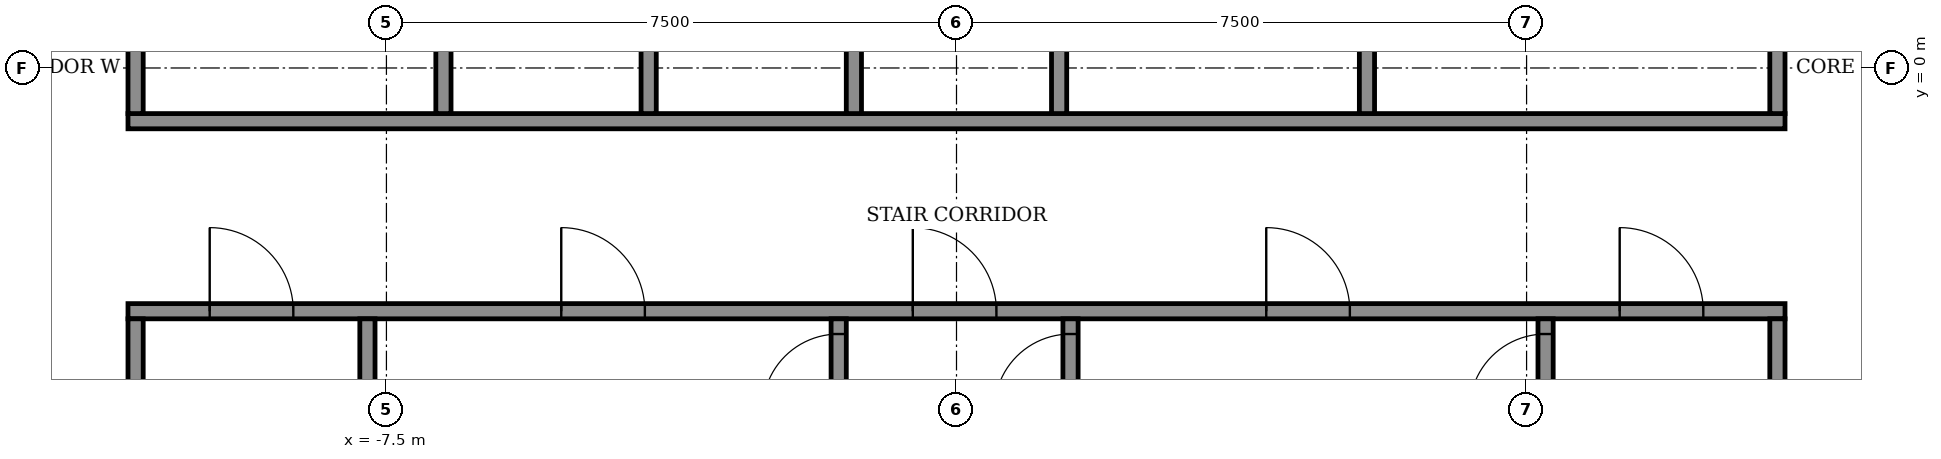
"""IFC4 building model, lengths in metres.
Left out: names, types, materials, properties, quantities, classifications, styles, units other than length and angle.
Written with IfcOpenShell. Run it as: python <this file> out.ifc"""

import sys

from ifc_helpers import new_model, si_unit, direction, frame, frame_2d, origin, place, context, subcontext, project, spatial, rectangle, extrude, element, fill, save


model = new_model("IFC4")
c1 = context("Model", 3, precision=1e-05, world=origin(), true_north=direction((0.0, 1.0)))
c2 = subcontext(c1, "Body", "Model", "MODEL_VIEW")
j1 = project(units=[si_unit("LENGTHUNIT", "METRE"), si_unit("PLANEANGLEUNIT", "RADIAN")], contexts=[c1])
p1 = place(None, origin())
s1 = spatial("IfcSite", under=j1, at=p1, CompositionType="ELEMENT")
p2 = place(p1, origin())
s2 = spatial("IfcBuilding", under=s1, at=p2, CompositionType="ELEMENT")
p3 = place(p2, frame((0.0, 0.0, 271.7)))
s3 = spatial("IfcBuildingStorey", under=s2, at=p3, CompositionType="ELEMENT", Elevation=271.7)
p4 = place(p3, frame((-10.9, -3.2, 0.0), z_axis=(0.0, 0.0, 1.0), x_axis=(1.0, 0.0, 0.0)))
e1 = element("IfcWall", 1, at=p4, inside=s3, PredefinedType="SHEAR", context=c2, shape_type="SweptSolid", body=[
    extrude(rectangle(XDim=21.8, YDim=0.2, at=frame_2d((10.9, 0.0))), origin(), (0.0, 0.0, 1.0), 3.05),
])
p5 = place(p4, frame((1.075, 0.0, 0.0)))
e2 = element("IfcOpeningElement", 2, at=p5, cuts=e1, PredefinedType="OPENING", context=c2, shape_type="SweptSolid", body=[
    extrude(rectangle(XDim=1.1, YDim=2.1, at=frame_2d((0.55, 1.05))), frame((0.0, 0.11, 0.0), z_axis=(0.0, -1.0, 0.0), x_axis=(1.0, 0.0, 0.0)), (0.0, 0.0, 1.0), 0.22),
])
p6 = place(p4, frame((10.325, 0.0, 0.0)))
e3 = element("IfcOpeningElement", 3, at=p6, cuts=e1, PredefinedType="OPENING", context=c2, shape_type="SweptSolid", body=[
    extrude(rectangle(XDim=1.1, YDim=2.1, at=frame_2d((0.55, 1.05))), frame((0.0, 0.11, 0.0), z_axis=(0.0, -1.0, 0.0), x_axis=(1.0, 0.0, 0.0)), (0.0, 0.0, 1.0), 0.22),
])
p7 = place(p4, frame((19.625, 0.0, 0.0)))
e4 = element("IfcOpeningElement", 4, at=p7, cuts=e1, PredefinedType="OPENING", context=c2, shape_type="SweptSolid", body=[
    extrude(rectangle(XDim=1.1, YDim=2.1, at=frame_2d((0.55, 1.05))), frame((0.0, 0.11, 0.0), z_axis=(0.0, -1.0, 0.0), x_axis=(1.0, 0.0, 0.0)), (0.0, 0.0, 1.0), 0.22),
])
p8 = place(p4, frame((5.7, 0.0, 0.0)))
e5 = element("IfcOpeningElement", 5, at=p8, cuts=e1, PredefinedType="OPENING", context=c2, shape_type="SweptSolid", body=[
    extrude(rectangle(XDim=1.1, YDim=2.1, at=frame_2d((0.55, 1.05))), frame((0.0, 0.11, 0.0), z_axis=(0.0, -1.0, 0.0), x_axis=(1.0, 0.0, 0.0)), (0.0, 0.0, 1.0), 0.22),
])
p9 = place(p4, frame((14.975, 0.0, 0.0)))
e6 = element("IfcOpeningElement", 6, at=p9, cuts=e1, PredefinedType="OPENING", context=c2, shape_type="SweptSolid", body=[
    extrude(rectangle(XDim=1.1, YDim=2.1, at=frame_2d((0.55, 1.05))), frame((0.0, 0.11, 0.0), z_axis=(0.0, -1.0, 0.0), x_axis=(1.0, 0.0, 0.0)), (0.0, 0.0, 1.0), 0.22),
])
p10 = place(p3, frame((-10.9, -0.7, 0.0), z_axis=(0.0, 0.0, 1.0), x_axis=(1.0, 0.0, 0.0)))
e7 = element("IfcWall", 7, at=p10, inside=s3, PredefinedType="SHEAR", context=c2, shape_type="SweptSolid", body=[
    extrude(rectangle(XDim=21.8, YDim=0.2, at=frame_2d((10.9, 0.0))), origin(), (0.0, 0.0, 1.0), 3.05),
])
for number, where, z_axis, x_axis in (
    (8, (-10.8, -10.8, 0.0), (0.0, 0.0, 1.0), (0.0, 1.0, 0.0)),
    (9, (-7.75, -10.8, 0.0), (0.0, 0.0, 1.0), (0.0, 1.0, 0.0)),
):
    element("IfcWall", number, at=place(p3, frame(where, z_axis=z_axis, x_axis=x_axis)), inside=s3, PredefinedType="SHEAR", context=c2, shape_type="SweptSolid", body=[
        extrude(rectangle(XDim=7.5, YDim=0.2, at=frame_2d((3.75, 0.0))), origin(), (0.0, 0.0, 1.0), 3.05),
    ])
p11 = place(p3, frame((-1.55, -10.8, 0.0), z_axis=(0.0, 0.0, 1.0), x_axis=(0.0, 1.0, 0.0)))
e10 = element("IfcWall", 10, at=p11, inside=s3, PredefinedType="SHEAR", context=c2, shape_type="SweptSolid", body=[
    extrude(rectangle(XDim=7.5, YDim=0.2, at=frame_2d((3.75, 0.0))), origin(), (0.0, 0.0, 1.0), 3.05),
])
p12 = place(p11, frame((6.3, 0.0, 0.0)))
e11 = element("IfcOpeningElement", 11, at=p12, cuts=e10, PredefinedType="OPENING", context=c2, shape_type="SweptSolid", body=[
    extrude(rectangle(XDim=1.0, YDim=2.1, at=frame_2d((0.5, 1.05))), frame((0.0, 0.11, 0.0), z_axis=(0.0, -1.0, 0.0), x_axis=(1.0, 0.0, 0.0)), (0.0, 0.0, 1.0), 0.22),
])
p13 = place(p3, frame((1.5, -10.8, 0.0), z_axis=(0.0, 0.0, 1.0), x_axis=(0.0, 1.0, 0.0)))
e12 = element("IfcWall", 12, at=p13, inside=s3, PredefinedType="SHEAR", context=c2, shape_type="SweptSolid", body=[
    extrude(rectangle(XDim=7.5, YDim=0.2, at=frame_2d((3.75, 0.0))), origin(), (0.0, 0.0, 1.0), 3.05),
])
p14 = place(p13, frame((6.3, 0.0, 0.0)))
e13 = element("IfcOpeningElement", 13, at=p14, cuts=e12, PredefinedType="OPENING", context=c2, shape_type="SweptSolid", body=[
    extrude(rectangle(XDim=1.0, YDim=2.1, at=frame_2d((0.5, 1.05))), frame((0.0, 0.11, 0.0), z_axis=(0.0, -1.0, 0.0), x_axis=(1.0, 0.0, 0.0)), (0.0, 0.0, 1.0), 0.22),
])
p15 = place(p3, frame((7.75, -10.8, 0.0), z_axis=(0.0, 0.0, 1.0), x_axis=(0.0, 1.0, 0.0)))
e14 = element("IfcWall", 14, at=p15, inside=s3, PredefinedType="SHEAR", context=c2, shape_type="SweptSolid", body=[
    extrude(rectangle(XDim=7.5, YDim=0.2, at=frame_2d((3.75, 0.0))), origin(), (0.0, 0.0, 1.0), 3.05),
])
p16 = place(p15, frame((6.3, 0.0, 0.0)))
e15 = element("IfcOpeningElement", 15, at=p16, cuts=e14, PredefinedType="OPENING", context=c2, shape_type="SweptSolid", body=[
    extrude(rectangle(XDim=1.0, YDim=2.1, at=frame_2d((0.5, 1.05))), frame((0.0, 0.11, 0.0), z_axis=(0.0, -1.0, 0.0), x_axis=(1.0, 0.0, 0.0)), (0.0, 0.0, 1.0), 0.22),
])
p17 = place(p3, frame((10.8, -10.8, 0.0), z_axis=(0.0, 0.0, 1.0), x_axis=(0.0, 1.0, 0.0)))
e16 = element("IfcWall", 16, at=p17, inside=s3, PredefinedType="SHEAR", context=c2, shape_type="SweptSolid", body=[
    extrude(rectangle(XDim=7.5, YDim=0.2, at=frame_2d((3.75, 0.0))), origin(), (0.0, 0.0, 1.0), 3.05),
])
p18 = place(p3, frame((-10.8, -0.6, 0.0), z_axis=(0.0, 0.0, 1.0), x_axis=(0.0, 1.0, 0.0)))
e17 = element("IfcWall", 17, at=p18, inside=s3, PredefinedType="STANDARD", context=c2, shape_type="SweptSolid", body=[
    extrude(rectangle(XDim=2.5, YDim=0.2, at=frame_2d((1.25, 0.0))), origin(), (0.0, 0.0, 1.0), 3.05),
])
for number, where, z_axis, x_axis in (
    (18, (-6.75, -0.6, 0.0), (0.0, 0.0, 1.0), (0.0, 1.0, 0.0)),
    (19, (-4.05, -0.6, 0.0), (0.0, 0.0, 1.0), (0.0, 1.0, 0.0)),
    (20, (-1.35, -0.6, 0.0), (0.0, 0.0, 1.0), (0.0, 1.0, 0.0)),
    (21, (1.35, -0.6, 0.0), (0.0, 0.0, 1.0), (0.0, 1.0, 0.0)),
):
    element("IfcWall", number, at=place(p3, frame(where, z_axis=z_axis, x_axis=x_axis)), inside=s3, PredefinedType="SHEAR", context=c2, shape_type="SweptSolid", body=[
        extrude(rectangle(XDim=2.5, YDim=0.2, at=frame_2d((1.25, 0.0))), origin(), (0.0, 0.0, 1.0), 3.05),
    ])
for number, where, z_axis, x_axis in (
    (22, (5.4, -0.6, 0.0), (0.0, 0.0, 1.0), (0.0, 1.0, 0.0)),
    (23, (10.8, -0.6, 0.0), (0.0, 0.0, 1.0), (0.0, 1.0, 0.0)),
):
    element("IfcWall", number, at=place(p3, frame(where, z_axis=z_axis, x_axis=x_axis)), inside=s3, PredefinedType="STANDARD", context=c2, shape_type="SweptSolid", body=[
        extrude(rectangle(XDim=2.5, YDim=0.2, at=frame_2d((1.25, 0.0))), origin(), (0.0, 0.0, 1.0), 3.05),
    ])
p19 = place(p5, origin())
e24 = element("IfcDoor", 24, at=p19, inside=s3, OperationType="SINGLE_SWING_RIGHT", PredefinedType="DOOR", context=c2, shape_type="SweptSolid", body=[
    extrude(rectangle(XDim=1.1, YDim=2.1, at=frame_2d((0.55, 1.05))), frame((0.0, 0.025, 0.0), z_axis=(0.0, -1.0, 0.0), x_axis=(1.0, 0.0, 0.0)), (0.0, 0.0, 1.0), 0.05),
])
fill(e2, e24)
p20 = place(p6, origin())
e25 = element("IfcDoor", 25, at=p20, inside=s3, OperationType="SINGLE_SWING_RIGHT", PredefinedType="DOOR", context=c2, shape_type="SweptSolid", body=[
    extrude(rectangle(XDim=1.1, YDim=2.1, at=frame_2d((0.55, 1.05))), frame((0.0, 0.025, 0.0), z_axis=(0.0, -1.0, 0.0), x_axis=(1.0, 0.0, 0.0)), (0.0, 0.0, 1.0), 0.05),
])
fill(e3, e25)
p21 = place(p7, origin())
e26 = element("IfcDoor", 26, at=p21, inside=s3, OperationType="SINGLE_SWING_RIGHT", PredefinedType="DOOR", context=c2, shape_type="SweptSolid", body=[
    extrude(rectangle(XDim=1.1, YDim=2.1, at=frame_2d((0.55, 1.05))), frame((0.0, 0.025, 0.0), z_axis=(0.0, -1.0, 0.0), x_axis=(1.0, 0.0, 0.0)), (0.0, 0.0, 1.0), 0.05),
])
fill(e4, e26)
p22 = place(p8, origin())
e27 = element("IfcDoor", 27, at=p22, inside=s3, OperationType="SINGLE_SWING_LEFT", PredefinedType="DOOR", context=c2, shape_type="SweptSolid", body=[
    extrude(rectangle(XDim=1.1, YDim=2.1, at=frame_2d((0.55, 1.05))), frame((0.0, 0.025, 0.0), z_axis=(0.0, -1.0, 0.0), x_axis=(1.0, 0.0, 0.0)), (0.0, 0.0, 1.0), 0.05),
])
fill(e5, e27)
p23 = place(p9, origin())
e28 = element("IfcDoor", 28, at=p23, inside=s3, OperationType="SINGLE_SWING_LEFT", PredefinedType="DOOR", context=c2, shape_type="SweptSolid", body=[
    extrude(rectangle(XDim=1.1, YDim=2.1, at=frame_2d((0.55, 1.05))), frame((0.0, 0.025, 0.0), z_axis=(0.0, -1.0, 0.0), x_axis=(1.0, 0.0, 0.0)), (0.0, 0.0, 1.0), 0.05),
])
fill(e6, e28)
p24 = place(p12, origin())
e29 = element("IfcDoor", 29, at=p24, inside=s3, OperationType="SINGLE_SWING_RIGHT", PredefinedType="DOOR", context=c2, shape_type="SweptSolid", body=[
    extrude(rectangle(XDim=1.0, YDim=2.1, at=frame_2d((0.5, 1.05))), frame((0.0, 0.025, 0.0), z_axis=(0.0, -1.0, 0.0), x_axis=(1.0, 0.0, 0.0)), (0.0, 0.0, 1.0), 0.05),
])
fill(e11, e29)
p25 = place(p14, origin())
e30 = element("IfcDoor", 30, at=p25, inside=s3, OperationType="SINGLE_SWING_RIGHT", PredefinedType="DOOR", context=c2, shape_type="SweptSolid", body=[
    extrude(rectangle(XDim=1.0, YDim=2.1, at=frame_2d((0.5, 1.05))), frame((0.0, 0.025, 0.0), z_axis=(0.0, -1.0, 0.0), x_axis=(1.0, 0.0, 0.0)), (0.0, 0.0, 1.0), 0.05),
])
fill(e13, e30)
p26 = place(p16, origin())
e31 = element("IfcDoor", 31, at=p26, inside=s3, OperationType="SINGLE_SWING_RIGHT", PredefinedType="DOOR", context=c2, shape_type="SweptSolid", body=[
    extrude(rectangle(XDim=1.0, YDim=2.1, at=frame_2d((0.5, 1.05))), frame((0.0, 0.025, 0.0), z_axis=(0.0, -1.0, 0.0), x_axis=(1.0, 0.0, 0.0)), (0.0, 0.0, 1.0), 0.05),
])
fill(e15, e31)
save(model, sys.argv[1])
